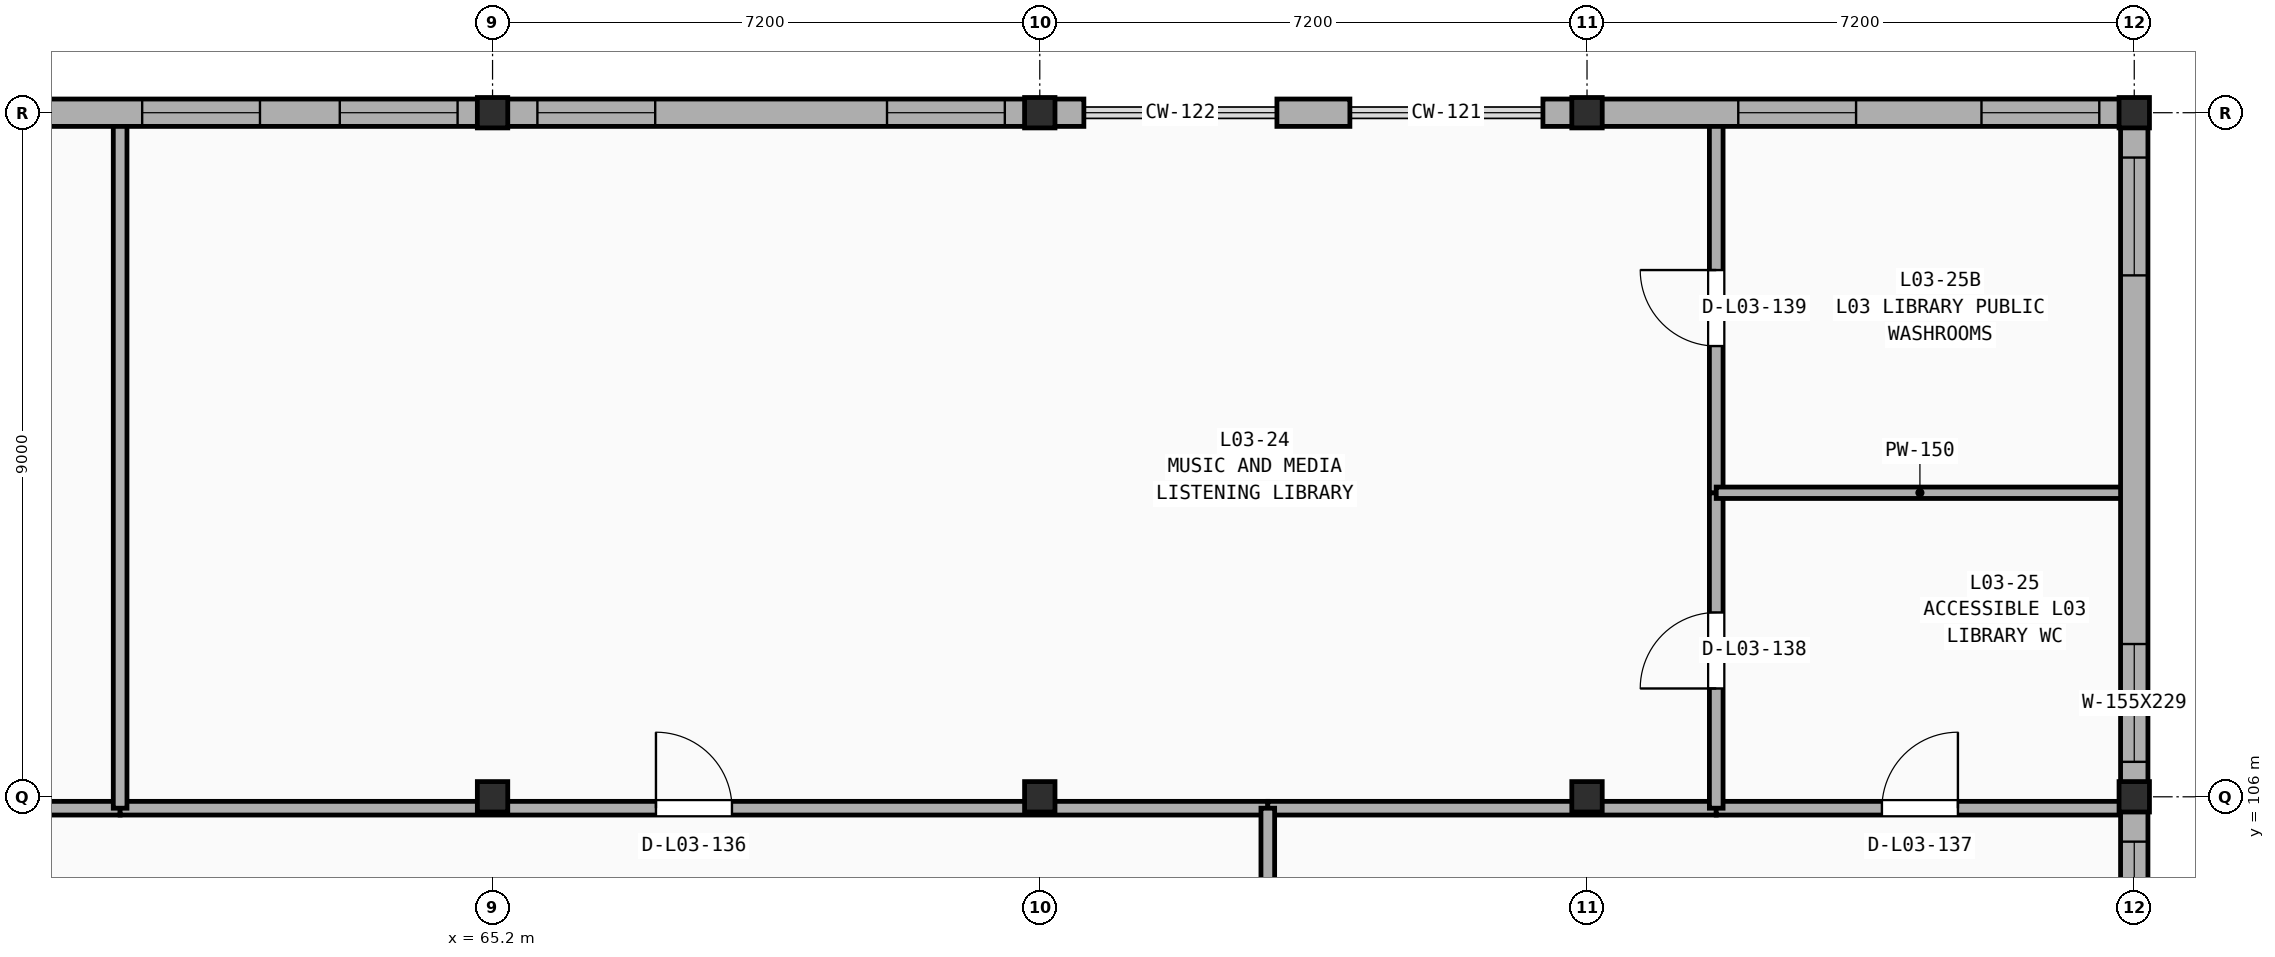
"""IFC4 building model, lengths in metres.
Left out: names, types, materials, properties, quantities, classifications, styles, units other than length and angle.
Written with IfcOpenShell. Run it as: python <this file> out.ifc"""

import sys

from ifc_helpers import new_model, si_unit, direction, frame, frame_2d, origin, origin_2d, place, context, subcontext, project, spatial, rectangle, extrude, element, fill, save


model = new_model("IFC4")
c1 = context("Model", 3, precision=1e-05, world=origin(), true_north=direction((0.0, 1.0)))
c2 = subcontext(c1, "Body", "Model", "MODEL_VIEW")
j1 = project(units=[si_unit("LENGTHUNIT", "METRE"), si_unit("PLANEANGLEUNIT", "RADIAN")], contexts=[c1])
p1 = place(None, origin())
s1 = spatial("IfcSite", under=j1, at=p1, CompositionType="ELEMENT")
p2 = place(p1, origin())
s2 = spatial("IfcBuilding", under=s1, at=p2, CompositionType="ELEMENT")
p3 = place(p2, frame((0.0, 0.0, 13.8)))
s3 = spatial("IfcBuildingStorey", under=s2, at=p3, CompositionType="ELEMENT", Elevation=13.8)
for number, where, z_axis, x_axis in (
    (1, (65.2, 106.0, 0.0), (0.0, 0.0, 1.0), (1.0, 0.0, 0.0)),
    (2, (65.2, 115.0, 0.0), (0.0, 0.0, 1.0), (1.0, 0.0, 0.0)),
    (3, (72.4, 106.0, 0.0), (0.0, 0.0, 1.0), (1.0, 0.0, 0.0)),
    (4, (72.4, 115.0, 0.0), (0.0, 0.0, 1.0), (1.0, 0.0, 0.0)),
    (5, (79.6, 106.0, 0.0), (0.0, 0.0, 1.0), (1.0, 0.0, 0.0)),
    (6, (79.6, 115.0, 0.0), (0.0, 0.0, 1.0), (1.0, 0.0, 0.0)),
    (7, (86.8, 106.0, 0.0), (0.0, 0.0, 1.0), (1.0, 0.0, 0.0)),
    (8, (86.8, 115.0, 0.0), (0.0, 0.0, 1.0), (1.0, 0.0, 0.0)),
):
    element("IfcColumn", number, at=place(p3, frame(where, z_axis=z_axis, x_axis=x_axis)), inside=s3, PredefinedType="COLUMN", context=c2, shape_type="SweptSolid", body=[
        extrude(rectangle(XDim=0.4, YDim=0.4, at=origin_2d()), origin(), (0.0, 0.0, 1.0), 3.9),
    ])
p4 = place(p3, frame((54.55, 105.85, 0.0), z_axis=(0.0, 0.0, 1.0), x_axis=(1.0, 0.0, 0.0)))
e9 = element("IfcWall", 9, at=p4, inside=s3, PredefinedType="PARTITIONING", context=c2, shape_type="SweptSolid", body=[
    extrude(rectangle(XDim=5.75, YDim=0.18, at=frame_2d((2.875, 0.0))), origin(), (0.0, 0.0, 1.0), 3.15),
])
p5 = place(p3, frame((60.3, 105.85, 0.0), z_axis=(0.0, 0.0, 1.0), x_axis=(1.0, 0.0, 0.0)))
e10 = element("IfcWall", 10, at=p5, inside=s3, PredefinedType="PARTITIONING", context=c2, shape_type="SweptSolid", body=[
    extrude(rectangle(XDim=15.1, YDim=0.18, at=frame_2d((7.55, 0.0))), origin(), (0.0, 0.0, 1.0), 3.15),
])
p6 = place(p5, frame((7.05, 0.0, -0.01)))
e11 = element("IfcOpeningElement", 11, at=p6, cuts=e10, PredefinedType="OPENING", context=c2, shape_type="SweptSolid", body=[
    extrude(rectangle(XDim=1.0, YDim=2.16, at=frame_2d((0.5, 1.08))), frame((0.0, 0.1, 0.0), z_axis=(0.0, -1.0, 0.0), x_axis=(1.0, 0.0, 0.0)), (0.0, 0.0, 1.0), 0.2),
])
p7 = place(p3, frame((75.4, 105.85, 0.0), z_axis=(0.0, 0.0, 1.0), x_axis=(1.0, 0.0, 0.0)))
e12 = element("IfcWall", 12, at=p7, inside=s3, PredefinedType="PARTITIONING", context=c2, shape_type="SweptSolid", body=[
    extrude(rectangle(XDim=5.9, YDim=0.18, at=frame_2d((2.95, 0.0))), origin(), (0.0, 0.0, 1.0), 3.15),
])
p8 = place(p3, frame((81.3, 105.85, 0.0), z_axis=(0.0, 0.0, 1.0), x_axis=(1.0, 0.0, 0.0)))
e13 = element("IfcWall", 13, at=p8, inside=s3, PredefinedType="PARTITIONING", context=c2, shape_type="SweptSolid", body=[
    extrude(rectangle(XDim=5.36, YDim=0.18, at=frame_2d((2.68, 0.0))), origin(), (0.0, 0.0, 1.0), 3.18),
])
p9 = place(p8, frame((2.18, 0.0, -0.01)))
e14 = element("IfcOpeningElement", 14, at=p9, cuts=e13, PredefinedType="OPENING", context=c2, shape_type="SweptSolid", body=[
    extrude(rectangle(XDim=1.0, YDim=2.16, at=frame_2d((0.5, 1.08))), frame((0.0, 0.1, 0.0), z_axis=(0.0, -1.0, 0.0), x_axis=(1.0, 0.0, 0.0)), (0.0, 0.0, 1.0), 0.2),
])
p10 = place(p3, frame((60.3, 105.85, 0.0), z_axis=(0.0, 0.0, 1.0), x_axis=(0.0, 1.0, 0.0)))
e15 = element("IfcWall", 15, at=p10, inside=s3, PredefinedType="PARTITIONING", context=c2, shape_type="SweptSolid", body=[
    extrude(rectangle(XDim=9.01, YDim=0.18, at=frame_2d((4.505, 0.0))), origin(), (0.0, 0.0, 1.0), 3.18),
])
p11 = place(p3, frame((81.3, 105.85, 0.0), z_axis=(0.0, 0.0, 1.0), x_axis=(0.0, 1.0, 0.0)))
e16 = element("IfcWall", 16, at=p11, inside=s3, PredefinedType="PARTITIONING", context=c2, shape_type="SweptSolid", body=[
    extrude(rectangle(XDim=4.15, YDim=0.18, at=frame_2d((2.075, 0.0))), origin(), (0.0, 0.0, 1.0), 3.18),
])
p12 = place(p11, frame((1.575, 0.0, -0.01)))
e17 = element("IfcOpeningElement", 17, at=p12, cuts=e16, PredefinedType="OPENING", context=c2, shape_type="SweptSolid", body=[
    extrude(rectangle(XDim=1.0, YDim=2.16, at=frame_2d((0.5, 1.08))), frame((0.0, 0.1, 0.0), z_axis=(0.0, -1.0, 0.0), x_axis=(1.0, 0.0, 0.0)), (0.0, 0.0, 1.0), 0.2),
])
p13 = place(p3, frame((81.3, 110.0, 0.0), z_axis=(0.0, 0.0, 1.0), x_axis=(0.0, 1.0, 0.0)))
e18 = element("IfcWall", 18, at=p13, inside=s3, PredefinedType="PARTITIONING", context=c2, shape_type="SweptSolid", body=[
    extrude(rectangle(XDim=4.86, YDim=0.18, at=frame_2d((2.43, 0.0))), origin(), (0.0, 0.0, 1.0), 3.37),
])
p14 = place(p13, frame((1.93, 0.0, -0.01)))
e19 = element("IfcOpeningElement", 19, at=p14, cuts=e18, PredefinedType="OPENING", context=c2, shape_type="SweptSolid", body=[
    extrude(rectangle(XDim=1.0, YDim=2.16, at=frame_2d((0.5, 1.08))), frame((0.0, 0.1, 0.0), z_axis=(0.0, -1.0, 0.0), x_axis=(1.0, 0.0, 0.0)), (0.0, 0.0, 1.0), 0.2),
])
p15 = place(p3, frame((81.3, 110.0, 0.0), z_axis=(0.0, 0.0, 1.0), x_axis=(1.0, 0.0, 0.0)))
e20 = element("IfcWall", 20, at=p15, inside=s3, PredefinedType="PARTITIONING", context=c2, shape_type="SweptSolid", body=[
    extrude(rectangle(XDim=5.36, YDim=0.15, at=frame_2d((2.68, 0.0))), origin(), (0.0, 0.0, 1.0), 3.31),
])
p16 = place(p3, frame((75.4, 97.5, 0.0), z_axis=(0.0, 0.0, 1.0), x_axis=(0.0, 1.0, 0.0)))
e21 = element("IfcWall", 21, at=p16, inside=s3, PredefinedType="PARTITIONING", context=c2, shape_type="SweptSolid", body=[
    extrude(rectangle(XDim=8.35, YDim=0.18, at=frame_2d((4.175, 0.0))), origin(), (0.0, 0.0, 1.0), 3.18),
])
p17 = place(p3, frame((65.2, 115.0, 0.0), z_axis=(0.0, 0.0, 1.0), x_axis=(-1.0, 0.0, 0.0)))
e22 = element("IfcWall", 22, at=p17, inside=s3, PredefinedType="SOLIDWALL", context=c2, shape_type="SweptSolid", body=[
    extrude(rectangle(XDim=7.2, YDim=0.36, at=frame_2d((3.6, 0.0))), origin(), (0.0, 0.0, 1.0), 3.15),
])
p18 = place(p17, frame((0.46, 0.0, 0.75)))
e23 = element("IfcOpeningElement", 23, at=p18, cuts=e22, PredefinedType="OPENING", context=c2, shape_type="SweptSolid", body=[
    extrude(rectangle(XDim=1.55, YDim=2.26, at=frame_2d((0.775, 1.13))), frame((0.0, 0.19, 0.0), z_axis=(0.0, -1.0, 0.0), x_axis=(1.0, 0.0, 0.0)), (0.0, 0.0, 1.0), 0.38),
])
p19 = place(p17, frame((3.06, 0.0, 0.75)))
e24 = element("IfcOpeningElement", 24, at=p19, cuts=e22, PredefinedType="OPENING", context=c2, shape_type="SweptSolid", body=[
    extrude(rectangle(XDim=1.55, YDim=2.26, at=frame_2d((0.775, 1.13))), frame((0.0, 0.19, 0.0), z_axis=(0.0, -1.0, 0.0), x_axis=(1.0, 0.0, 0.0)), (0.0, 0.0, 1.0), 0.38),
])
p20 = place(p3, frame((72.4, 115.0, 0.0), z_axis=(0.0, 0.0, 1.0), x_axis=(-1.0, 0.0, 0.0)))
e25 = element("IfcWall", 25, at=p20, inside=s3, PredefinedType="SOLIDWALL", context=c2, shape_type="SweptSolid", body=[
    extrude(rectangle(XDim=7.2, YDim=0.36, at=frame_2d((3.6, 0.0))), origin(), (0.0, 0.0, 1.0), 3.15),
])
p21 = place(p20, frame((0.46, 0.0, 0.75)))
e26 = element("IfcOpeningElement", 26, at=p21, cuts=e25, PredefinedType="OPENING", context=c2, shape_type="SweptSolid", body=[
    extrude(rectangle(XDim=1.55, YDim=2.26, at=frame_2d((0.775, 1.13))), frame((0.0, 0.19, 0.0), z_axis=(0.0, -1.0, 0.0), x_axis=(1.0, 0.0, 0.0)), (0.0, 0.0, 1.0), 0.38),
])
p22 = place(p20, frame((5.06, 0.0, 0.75)))
e27 = element("IfcOpeningElement", 27, at=p22, cuts=e25, PredefinedType="OPENING", context=c2, shape_type="SweptSolid", body=[
    extrude(rectangle(XDim=1.55, YDim=2.26, at=frame_2d((0.775, 1.13))), frame((0.0, 0.19, 0.0), z_axis=(0.0, -1.0, 0.0), x_axis=(1.0, 0.0, 0.0)), (0.0, 0.0, 1.0), 0.38),
])
p23 = place(p3, frame((76.48, 115.0, 0.0), z_axis=(0.0, 0.0, 1.0), x_axis=(-1.0, 0.0, 0.0)))
e28 = element("IfcWall", 28, at=p23, inside=s3, PredefinedType="SOLIDWALL", context=c2, shape_type="SweptSolid", body=[
    extrude(rectangle(XDim=0.96, YDim=0.36, at=frame_2d((0.48, 0.0))), origin(), (0.0, 0.0, 1.0), 3.15),
])
for number, where, z_axis, x_axis in (
    (29, (79.47, 115.0, 0.0), (0.0, 0.0, 1.0), (-1.0, 0.0, 0.0)),
    (30, (72.98, 115.0, 0.0), (0.0, 0.0, 1.0), (-1.0, 0.0, 0.0)),
):
    element("IfcWall", number, at=place(p3, frame(where, z_axis=z_axis, x_axis=x_axis)), inside=s3, PredefinedType="SOLIDWALL", context=c2, shape_type="SweptSolid", body=[
        extrude(rectangle(XDim=0.45, YDim=0.36, at=frame_2d((0.225, 0.0))), origin(), (0.0, 0.0, 1.0), 3.15),
    ])
p24 = place(p3, frame((86.8, 115.0, 0.0), z_axis=(0.0, 0.0, 1.0), x_axis=(-1.0, 0.0, 0.0)))
e31 = element("IfcWall", 31, at=p24, inside=s3, PredefinedType="SOLIDWALL", context=c2, shape_type="SweptSolid", body=[
    extrude(rectangle(XDim=7.2, YDim=0.36, at=frame_2d((3.6, 0.0))), origin(), (0.0, 0.0, 1.0), 3.15),
])
p25 = place(p24, frame((0.46, 0.0, 0.75)))
e32 = element("IfcOpeningElement", 32, at=p25, cuts=e31, PredefinedType="OPENING", context=c2, shape_type="SweptSolid", body=[
    extrude(rectangle(XDim=1.55, YDim=2.26, at=frame_2d((0.775, 1.13))), frame((0.0, 0.19, 0.0), z_axis=(0.0, -1.0, 0.0), x_axis=(1.0, 0.0, 0.0)), (0.0, 0.0, 1.0), 0.38),
])
p26 = place(p24, frame((3.66, 0.0, 0.75)))
e33 = element("IfcOpeningElement", 33, at=p26, cuts=e31, PredefinedType="OPENING", context=c2, shape_type="SweptSolid", body=[
    extrude(rectangle(XDim=1.55, YDim=2.26, at=frame_2d((0.775, 1.13))), frame((0.0, 0.19, 0.0), z_axis=(0.0, -1.0, 0.0), x_axis=(1.0, 0.0, 0.0)), (0.0, 0.0, 1.0), 0.38),
])
p27 = place(p3, frame((86.8, 97.6, 0.0), z_axis=(0.0, 0.0, 1.0), x_axis=(0.0, 1.0, 0.0)))
e34 = element("IfcWall", 34, at=p27, inside=s3, PredefinedType="SOLIDWALL", context=c2, shape_type="SweptSolid", body=[
    extrude(rectangle(XDim=8.4, YDim=0.36, at=frame_2d((4.2, 0.0))), origin(), (0.0, 0.0, 1.0), 3.18),
])
p28 = place(p27, frame((0.46, 0.0, 0.75)))
e35 = element("IfcOpeningElement", 35, at=p28, cuts=e34, PredefinedType="OPENING", context=c2, shape_type="SweptSolid", body=[
    extrude(rectangle(XDim=1.55, YDim=2.29, at=frame_2d((0.775, 1.145))), frame((0.0, 0.19, 0.0), z_axis=(0.0, -1.0, 0.0), x_axis=(1.0, 0.0, 0.0)), (0.0, 0.0, 1.0), 0.38),
])
p29 = place(p27, frame((6.26, 0.0, 0.75)))
e36 = element("IfcOpeningElement", 36, at=p29, cuts=e34, PredefinedType="OPENING", context=c2, shape_type="SweptSolid", body=[
    extrude(rectangle(XDim=1.55, YDim=2.29, at=frame_2d((0.775, 1.145))), frame((0.0, 0.19, 0.0), z_axis=(0.0, -1.0, 0.0), x_axis=(1.0, 0.0, 0.0)), (0.0, 0.0, 1.0), 0.38),
])
p30 = place(p3, frame((86.8, 106.0, 0.0), z_axis=(0.0, 0.0, 1.0), x_axis=(0.0, 1.0, 0.0)))
e37 = element("IfcWall", 37, at=p30, inside=s3, PredefinedType="SOLIDWALL", context=c2, shape_type="SweptSolid", body=[
    extrude(rectangle(XDim=9.0, YDim=0.36, at=frame_2d((4.5, 0.0))), origin(), (0.0, 0.0, 1.0), 3.18),
])
p31 = place(p30, frame((0.46, 0.0, 0.75)))
e38 = element("IfcOpeningElement", 38, at=p31, cuts=e37, PredefinedType="OPENING", context=c2, shape_type="SweptSolid", body=[
    extrude(rectangle(XDim=1.55, YDim=2.29, at=frame_2d((0.775, 1.145))), frame((0.0, 0.19, 0.0), z_axis=(0.0, -1.0, 0.0), x_axis=(1.0, 0.0, 0.0)), (0.0, 0.0, 1.0), 0.38),
])
p32 = place(p30, frame((6.86, 0.0, 0.75)))
e39 = element("IfcOpeningElement", 39, at=p32, cuts=e37, PredefinedType="OPENING", context=c2, shape_type="SweptSolid", body=[
    extrude(rectangle(XDim=1.55, YDim=2.29, at=frame_2d((0.775, 1.145))), frame((0.0, 0.19, 0.0), z_axis=(0.0, -1.0, 0.0), x_axis=(1.0, 0.0, 0.0)), (0.0, 0.0, 1.0), 0.38),
])
p33 = place(p6, frame((0.0, 0.0, 0.01)))
e40 = element("IfcDoor", 40, at=p33, inside=s3, OperationType="SINGLE_SWING_LEFT", PredefinedType="DOOR", context=c2, shape_type="SweptSolid", body=[
    extrude(rectangle(XDim=1.0, YDim=2.15, at=frame_2d((0.5, 1.075))), frame((0.0, 0.025, 0.0), z_axis=(0.0, -1.0, 0.0), x_axis=(1.0, 0.0, 0.0)), (0.0, 0.0, 1.0), 0.05),
])
fill(e11, e40)
p34 = place(p9, frame((0.0, 0.0, 0.01)))
e41 = element("IfcDoor", 41, at=p34, inside=s3, OperationType="SINGLE_SWING_RIGHT", PredefinedType="DOOR", context=c2, shape_type="SweptSolid", body=[
    extrude(rectangle(XDim=1.0, YDim=2.15, at=frame_2d((0.5, 1.075))), frame((0.0, 0.025, 0.0), z_axis=(0.0, -1.0, 0.0), x_axis=(1.0, 0.0, 0.0)), (0.0, 0.0, 1.0), 0.05),
])
fill(e14, e41)
p35 = place(p12, frame((1.0, 0.0, 0.01), z_axis=(0.0, 0.0, 1.0), x_axis=(-1.0, 0.0, 0.0)))
e42 = element("IfcDoor", 42, at=p35, inside=s3, OperationType="SINGLE_SWING_LEFT", PredefinedType="DOOR", context=c2, shape_type="SweptSolid", body=[
    extrude(rectangle(XDim=1.0, YDim=2.15, at=frame_2d((0.5, 1.075))), frame((0.0, 0.025, 0.0), z_axis=(0.0, -1.0, 0.0), x_axis=(1.0, 0.0, 0.0)), (0.0, 0.0, 1.0), 0.05),
])
fill(e17, e42)
p36 = place(p14, frame((0.0, 0.0, 0.01)))
e43 = element("IfcDoor", 43, at=p36, inside=s3, OperationType="SINGLE_SWING_RIGHT", PredefinedType="DOOR", context=c2, shape_type="SweptSolid", body=[
    extrude(rectangle(XDim=1.0, YDim=2.15, at=frame_2d((0.5, 1.075))), frame((0.0, 0.025, 0.0), z_axis=(0.0, -1.0, 0.0), x_axis=(1.0, 0.0, 0.0)), (0.0, 0.0, 1.0), 0.05),
])
fill(e19, e43)
p37 = place(p18, origin())
e44 = element("IfcWindow", 44, at=p37, inside=s3, PartitioningType="DOUBLE_PANEL_HORIZONTAL", PredefinedType="WINDOW", context=c2, shape_type="SweptSolid", body=[
    extrude(rectangle(XDim=1.55, YDim=2.26, at=frame_2d((0.775, 1.13))), frame((0.0, 0.03, 0.0), z_axis=(0.0, -1.0, 0.0), x_axis=(1.0, 0.0, 0.0)), (0.0, 0.0, 1.0), 0.06),
])
fill(e23, e44)
p38 = place(p19, origin())
e45 = element("IfcWindow", 45, at=p38, inside=s3, PartitioningType="DOUBLE_PANEL_HORIZONTAL", PredefinedType="WINDOW", context=c2, shape_type="SweptSolid", body=[
    extrude(rectangle(XDim=1.55, YDim=2.26, at=frame_2d((0.775, 1.13))), frame((0.0, 0.03, 0.0), z_axis=(0.0, -1.0, 0.0), x_axis=(1.0, 0.0, 0.0)), (0.0, 0.0, 1.0), 0.06),
])
fill(e24, e45)
p39 = place(p21, origin())
e46 = element("IfcWindow", 46, at=p39, inside=s3, PartitioningType="DOUBLE_PANEL_HORIZONTAL", PredefinedType="WINDOW", context=c2, shape_type="SweptSolid", body=[
    extrude(rectangle(XDim=1.55, YDim=2.26, at=frame_2d((0.775, 1.13))), frame((0.0, 0.03, 0.0), z_axis=(0.0, -1.0, 0.0), x_axis=(1.0, 0.0, 0.0)), (0.0, 0.0, 1.0), 0.06),
])
fill(e26, e46)
p40 = place(p22, origin())
e47 = element("IfcWindow", 47, at=p40, inside=s3, PartitioningType="DOUBLE_PANEL_HORIZONTAL", PredefinedType="WINDOW", context=c2, shape_type="SweptSolid", body=[
    extrude(rectangle(XDim=1.55, YDim=2.26, at=frame_2d((0.775, 1.13))), frame((0.0, 0.03, 0.0), z_axis=(0.0, -1.0, 0.0), x_axis=(1.0, 0.0, 0.0)), (0.0, 0.0, 1.0), 0.06),
])
fill(e27, e47)
p41 = place(p25, origin())
e48 = element("IfcWindow", 48, at=p41, inside=s3, PartitioningType="DOUBLE_PANEL_HORIZONTAL", PredefinedType="WINDOW", context=c2, shape_type="SweptSolid", body=[
    extrude(rectangle(XDim=1.55, YDim=2.26, at=frame_2d((0.775, 1.13))), frame((0.0, 0.03, 0.0), z_axis=(0.0, -1.0, 0.0), x_axis=(1.0, 0.0, 0.0)), (0.0, 0.0, 1.0), 0.06),
])
fill(e32, e48)
p42 = place(p26, origin())
e49 = element("IfcWindow", 49, at=p42, inside=s3, PartitioningType="DOUBLE_PANEL_HORIZONTAL", PredefinedType="WINDOW", context=c2, shape_type="SweptSolid", body=[
    extrude(rectangle(XDim=1.55, YDim=2.26, at=frame_2d((0.775, 1.13))), frame((0.0, 0.03, 0.0), z_axis=(0.0, -1.0, 0.0), x_axis=(1.0, 0.0, 0.0)), (0.0, 0.0, 1.0), 0.06),
])
fill(e33, e49)
p43 = place(p29, origin())
e50 = element("IfcWindow", 50, at=p43, inside=s3, PartitioningType="DOUBLE_PANEL_HORIZONTAL", PredefinedType="WINDOW", context=c2, shape_type="SweptSolid", body=[
    extrude(rectangle(XDim=1.55, YDim=2.29, at=frame_2d((0.775, 1.145))), frame((0.0, 0.03, 0.0), z_axis=(0.0, -1.0, 0.0), x_axis=(1.0, 0.0, 0.0)), (0.0, 0.0, 1.0), 0.06),
])
fill(e36, e50)
p44 = place(p31, origin())
e51 = element("IfcWindow", 51, at=p44, inside=s3, PartitioningType="DOUBLE_PANEL_HORIZONTAL", PredefinedType="WINDOW", context=c2, shape_type="SweptSolid", body=[
    extrude(rectangle(XDim=1.55, YDim=2.29, at=frame_2d((0.775, 1.145))), frame((0.0, 0.03, 0.0), z_axis=(0.0, -1.0, 0.0), x_axis=(1.0, 0.0, 0.0)), (0.0, 0.0, 1.0), 0.06),
])
fill(e38, e51)
p45 = place(p32, origin())
e52 = element("IfcWindow", 52, at=p45, inside=s3, PartitioningType="DOUBLE_PANEL_HORIZONTAL", PredefinedType="WINDOW", context=c2, shape_type="SweptSolid", body=[
    extrude(rectangle(XDim=1.55, YDim=2.29, at=frame_2d((0.775, 1.145))), frame((0.0, 0.03, 0.0), z_axis=(0.0, -1.0, 0.0), x_axis=(1.0, 0.0, 0.0)), (0.0, 0.0, 1.0), 0.06),
])
fill(e39, e52)
save(model, sys.argv[1])
